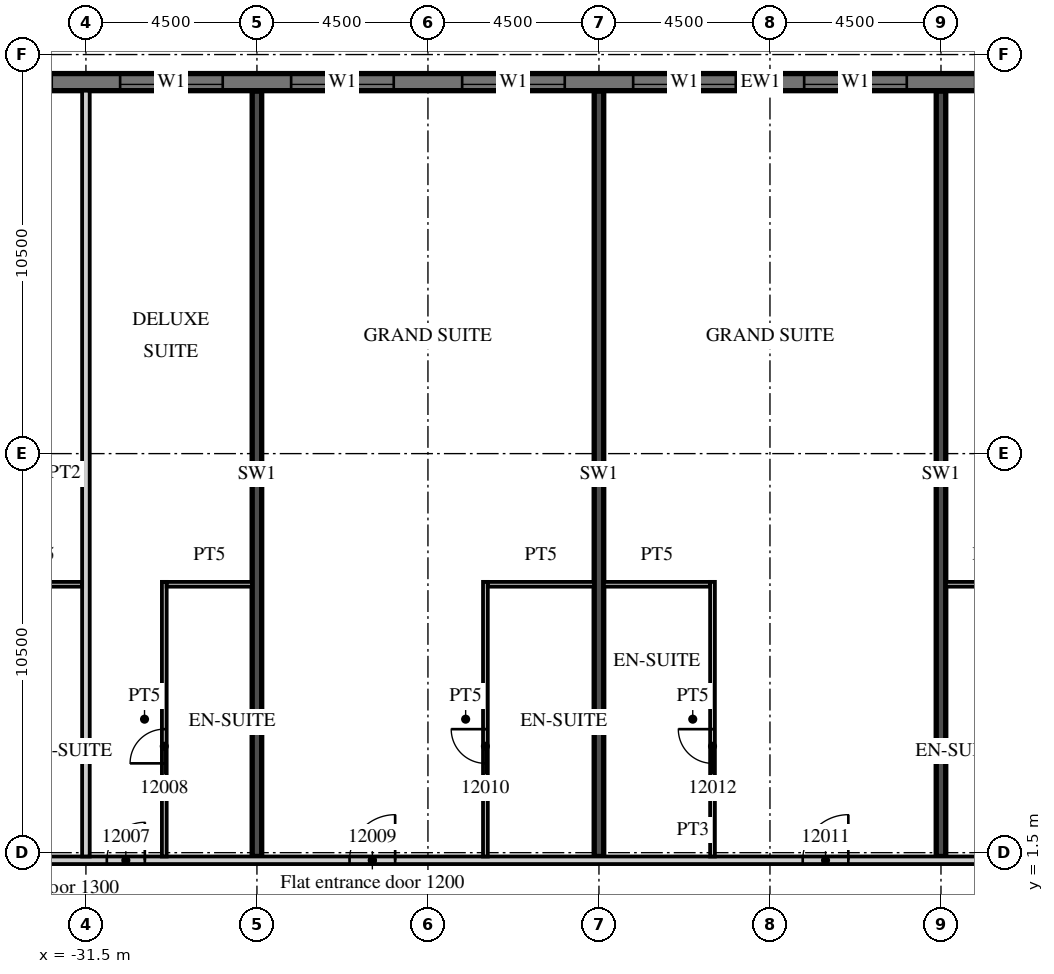
"""IFC4 building model, lengths in metres.
Left out: names, types, materials, properties, quantities, classifications, styles, units other than length and angle.
Written with IfcOpenShell. Run it as: python <this file> out.ifc"""

import sys

from ifc_helpers import new_model, si_unit, direction, frame, frame_2d, origin, place, context, subcontext, project, spatial, rectangle, extrude, element, fill, save


model = new_model("IFC4")
c1 = context("Model", 3, precision=1e-05, world=origin(), true_north=direction((0.0, 1.0)))
c2 = subcontext(c1, "Body", "Model", "MODEL_VIEW")
j1 = project(units=[si_unit("LENGTHUNIT", "METRE"), si_unit("PLANEANGLEUNIT", "RADIAN")], contexts=[c1])
p1 = place(None, origin())
s1 = spatial("IfcSite", under=j1, at=p1, CompositionType="ELEMENT")
p2 = place(p1, origin())
s2 = spatial("IfcBuilding", under=s1, at=p2, CompositionType="ELEMENT")
p3 = place(p2, frame((0.0, 0.0, 69.9)))
s3 = spatial("IfcBuildingStorey", under=s2, at=p3, CompositionType="ELEMENT", Elevation=69.9)
for number, where, z_axis, x_axis in (
    (1, (-27.0, 1.4, 0.0), (0.0, 0.0, 1.0), (0.0, 1.0, 0.0)),
    (2, (-18.0, 1.4, 0.0), (0.0, 0.0, 1.0), (0.0, 1.0, 0.0)),
    (3, (-9.0, 1.4, 0.0), (0.0, 0.0, 1.0), (0.0, 1.0, 0.0)),
):
    element("IfcWall", number, at=place(p3, frame(where, z_axis=z_axis, x_axis=x_axis)), inside=s3, PredefinedType="SHEAR", context=c2, shape_type="SweptSolid", body=[
        extrude(rectangle(XDim=20.14, YDim=0.25, at=frame_2d((10.07, 0.0))), origin(), (0.0, 0.0, 1.0), 3.3),
    ])
p4 = place(p3, frame((13.5, 21.775, 0.0), z_axis=(0.0, 0.0, 1.0), x_axis=(-1.0, 0.0, 0.0)))
e4 = element("IfcWall", 4, at=p4, inside=s3, PredefinedType="SOLIDWALL", context=c2, shape_type="SweptSolid", body=[
    extrude(rectangle(XDim=54.5, YDim=0.45, at=frame_2d((27.25, 0.0))), origin(), (0.0, 0.0, 1.0), 3.02),
])
p5 = place(p4, frame((0.9, 0.0, 0.45)))
e5 = element("IfcOpeningElement", 5, at=p5, cuts=e4, PredefinedType="OPENING", context=c2, shape_type="SweptSolid", body=[
    extrude(rectangle(XDim=2.7, YDim=2.25, at=frame_2d((1.35, 1.125))), frame((0.0, 0.235, 0.0), z_axis=(0.0, -1.0, 0.0), x_axis=(1.0, 0.0, 0.0)), (0.0, 0.0, 1.0), 0.47),
])
p6 = place(p4, frame((5.4, 0.0, 0.45)))
e6 = element("IfcOpeningElement", 6, at=p6, cuts=e4, PredefinedType="OPENING", context=c2, shape_type="SweptSolid", body=[
    extrude(rectangle(XDim=2.7, YDim=2.25, at=frame_2d((1.35, 1.125))), frame((0.0, 0.235, 0.0), z_axis=(0.0, -1.0, 0.0), x_axis=(1.0, 0.0, 0.0)), (0.0, 0.0, 1.0), 0.47),
])
p7 = place(p4, frame((9.9, 0.0, 0.45)))
e7 = element("IfcOpeningElement", 7, at=p7, cuts=e4, PredefinedType="OPENING", context=c2, shape_type="SweptSolid", body=[
    extrude(rectangle(XDim=2.7, YDim=2.25, at=frame_2d((1.35, 1.125))), frame((0.0, 0.235, 0.0), z_axis=(0.0, -1.0, 0.0), x_axis=(1.0, 0.0, 0.0)), (0.0, 0.0, 1.0), 0.47),
])
p8 = place(p4, frame((14.4, 0.0, 0.45)))
e8 = element("IfcOpeningElement", 8, at=p8, cuts=e4, PredefinedType="OPENING", context=c2, shape_type="SweptSolid", body=[
    extrude(rectangle(XDim=2.7, YDim=2.25, at=frame_2d((1.35, 1.125))), frame((0.0, 0.235, 0.0), z_axis=(0.0, -1.0, 0.0), x_axis=(1.0, 0.0, 0.0)), (0.0, 0.0, 1.0), 0.47),
])
p9 = place(p4, frame((18.9, 0.0, 0.45)))
e9 = element("IfcOpeningElement", 9, at=p9, cuts=e4, PredefinedType="OPENING", context=c2, shape_type="SweptSolid", body=[
    extrude(rectangle(XDim=2.7, YDim=2.25, at=frame_2d((1.35, 1.125))), frame((0.0, 0.235, 0.0), z_axis=(0.0, -1.0, 0.0), x_axis=(1.0, 0.0, 0.0)), (0.0, 0.0, 1.0), 0.47),
])
p10 = place(p4, frame((23.4, 0.0, 0.45)))
e10 = element("IfcOpeningElement", 10, at=p10, cuts=e4, PredefinedType="OPENING", context=c2, shape_type="SweptSolid", body=[
    extrude(rectangle(XDim=2.7, YDim=2.25, at=frame_2d((1.35, 1.125))), frame((0.0, 0.235, 0.0), z_axis=(0.0, -1.0, 0.0), x_axis=(1.0, 0.0, 0.0)), (0.0, 0.0, 1.0), 0.47),
])
p11 = place(p4, frame((27.9, 0.0, 0.45)))
e11 = element("IfcOpeningElement", 11, at=p11, cuts=e4, PredefinedType="OPENING", context=c2, shape_type="SweptSolid", body=[
    extrude(rectangle(XDim=2.7, YDim=2.25, at=frame_2d((1.35, 1.125))), frame((0.0, 0.235, 0.0), z_axis=(0.0, -1.0, 0.0), x_axis=(1.0, 0.0, 0.0)), (0.0, 0.0, 1.0), 0.47),
])
p12 = place(p4, frame((32.4, 0.0, 0.45)))
e12 = element("IfcOpeningElement", 12, at=p12, cuts=e4, PredefinedType="OPENING", context=c2, shape_type="SweptSolid", body=[
    extrude(rectangle(XDim=2.7, YDim=2.25, at=frame_2d((1.35, 1.125))), frame((0.0, 0.235, 0.0), z_axis=(0.0, -1.0, 0.0), x_axis=(1.0, 0.0, 0.0)), (0.0, 0.0, 1.0), 0.47),
])
p13 = place(p4, frame((36.9, 0.0, 0.45)))
e13 = element("IfcOpeningElement", 13, at=p13, cuts=e4, PredefinedType="OPENING", context=c2, shape_type="SweptSolid", body=[
    extrude(rectangle(XDim=2.7, YDim=2.25, at=frame_2d((1.35, 1.125))), frame((0.0, 0.235, 0.0), z_axis=(0.0, -1.0, 0.0), x_axis=(1.0, 0.0, 0.0)), (0.0, 0.0, 1.0), 0.47),
])
p14 = place(p4, frame((41.4, 0.0, 0.45)))
e14 = element("IfcOpeningElement", 14, at=p14, cuts=e4, PredefinedType="OPENING", context=c2, shape_type="SweptSolid", body=[
    extrude(rectangle(XDim=2.7, YDim=2.25, at=frame_2d((1.35, 1.125))), frame((0.0, 0.235, 0.0), z_axis=(0.0, -1.0, 0.0), x_axis=(1.0, 0.0, 0.0)), (0.0, 0.0, 1.0), 0.47),
])
p15 = place(p4, frame((45.9, 0.0, 0.45)))
e15 = element("IfcOpeningElement", 15, at=p15, cuts=e4, PredefinedType="OPENING", context=c2, shape_type="SweptSolid", body=[
    extrude(rectangle(XDim=2.7, YDim=2.25, at=frame_2d((1.35, 1.125))), frame((0.0, 0.235, 0.0), z_axis=(0.0, -1.0, 0.0), x_axis=(1.0, 0.0, 0.0)), (0.0, 0.0, 1.0), 0.47),
])
p16 = place(p4, frame((50.4, 0.0, 0.45)))
e16 = element("IfcOpeningElement", 16, at=p16, cuts=e4, PredefinedType="OPENING", context=c2, shape_type="SweptSolid", body=[
    extrude(rectangle(XDim=2.7, YDim=2.25, at=frame_2d((1.35, 1.125))), frame((0.0, 0.235, 0.0), z_axis=(0.0, -1.0, 0.0), x_axis=(1.0, 0.0, 0.0)), (0.0, 0.0, 1.0), 0.47),
])
p17 = place(p3, frame((-44.55, 1.3, 0.0), z_axis=(0.0, 0.0, 1.0), x_axis=(1.0, 0.0, 0.0)))
e17 = element("IfcWall", 17, at=p17, inside=s3, PredefinedType="PARTITIONING", context=c2, shape_type="SweptSolid", body=[
    extrude(rectangle(XDim=58.05, YDim=0.2, at=frame_2d((29.025, 0.0))), origin(), (0.0, 0.0, 1.0), 3.02),
])
p18 = place(p17, frame((0.525, 0.0, 0.0)))
e18 = element("IfcOpeningElement", 18, at=p18, cuts=e17, PredefinedType="OPENING", context=c2, shape_type="SweptSolid", body=[
    extrude(rectangle(XDim=1.0, YDim=2.1, at=frame_2d((0.5, 1.05))), frame((0.0, 0.11, 0.0), z_axis=(0.0, -1.0, 0.0), x_axis=(1.0, 0.0, 0.0)), (0.0, 0.0, 1.0), 0.22),
])
p19 = place(p17, frame((6.975, 0.0, 0.0)))
e19 = element("IfcOpeningElement", 19, at=p19, cuts=e17, PredefinedType="OPENING", context=c2, shape_type="SweptSolid", body=[
    extrude(rectangle(XDim=1.0, YDim=2.1, at=frame_2d((0.5, 1.05))), frame((0.0, 0.11, 0.0), z_axis=(0.0, -1.0, 0.0), x_axis=(1.0, 0.0, 0.0)), (0.0, 0.0, 1.0), 0.22),
])
p20 = place(p17, frame((9.125, 0.0, 0.0)))
e20 = element("IfcOpeningElement", 20, at=p20, cuts=e17, PredefinedType="OPENING", context=c2, shape_type="SweptSolid", body=[
    extrude(rectangle(XDim=1.0, YDim=2.1, at=frame_2d((0.5, 1.05))), frame((0.0, 0.11, 0.0), z_axis=(0.0, -1.0, 0.0), x_axis=(1.0, 0.0, 0.0)), (0.0, 0.0, 1.0), 0.22),
])
p21 = place(p17, frame((13.6, 0.0, 0.0)))
e21 = element("IfcOpeningElement", 21, at=p21, cuts=e17, PredefinedType="OPENING", context=c2, shape_type="SweptSolid", body=[
    extrude(rectangle(XDim=1.0, YDim=2.1, at=frame_2d((0.5, 1.05))), frame((0.0, 0.11, 0.0), z_axis=(0.0, -1.0, 0.0), x_axis=(1.0, 0.0, 0.0)), (0.0, 0.0, 1.0), 0.22),
])
p22 = place(p17, frame((19.987, 0.0, 0.0)))
e22 = element("IfcOpeningElement", 22, at=p22, cuts=e17, PredefinedType="OPENING", context=c2, shape_type="SweptSolid", body=[
    extrude(rectangle(XDim=1.2, YDim=2.1, at=frame_2d((0.6, 1.05))), frame((0.0, 0.11, 0.0), z_axis=(0.0, -1.0, 0.0), x_axis=(1.0, 0.0, 0.0)), (0.0, 0.0, 1.0), 0.22),
])
p23 = place(p17, frame((31.912, 0.0, 0.0)))
e23 = element("IfcOpeningElement", 23, at=p23, cuts=e17, PredefinedType="OPENING", context=c2, shape_type="SweptSolid", body=[
    extrude(rectangle(XDim=1.2, YDim=2.1, at=frame_2d((0.6, 1.05))), frame((0.0, 0.11, 0.0), z_axis=(0.0, -1.0, 0.0), x_axis=(1.0, 0.0, 0.0)), (0.0, 0.0, 1.0), 0.22),
])
p24 = place(p17, frame((38.5, 0.0, 0.0)))
e24 = element("IfcOpeningElement", 24, at=p24, cuts=e17, PredefinedType="OPENING", context=c2, shape_type="SweptSolid", body=[
    extrude(rectangle(XDim=1.0, YDim=2.1, at=frame_2d((0.5, 1.05))), frame((0.0, 0.11, 0.0), z_axis=(0.0, -1.0, 0.0), x_axis=(1.0, 0.0, 0.0)), (0.0, 0.0, 1.0), 0.22),
])
p25 = place(p17, frame((40.6, 0.0, 0.0)))
e25 = element("IfcOpeningElement", 25, at=p25, cuts=e17, PredefinedType="OPENING", context=c2, shape_type="SweptSolid", body=[
    extrude(rectangle(XDim=1.0, YDim=2.1, at=frame_2d((0.5, 1.05))), frame((0.0, 0.11, 0.0), z_axis=(0.0, -1.0, 0.0), x_axis=(1.0, 0.0, 0.0)), (0.0, 0.0, 1.0), 0.22),
])
p26 = place(p17, frame((47.5, 0.0, 0.0)))
e26 = element("IfcOpeningElement", 26, at=p26, cuts=e17, PredefinedType="OPENING", context=c2, shape_type="SweptSolid", body=[
    extrude(rectangle(XDim=1.0, YDim=2.1, at=frame_2d((0.5, 1.05))), frame((0.0, 0.11, 0.0), z_axis=(0.0, -1.0, 0.0), x_axis=(1.0, 0.0, 0.0)), (0.0, 0.0, 1.0), 0.22),
])
p27 = place(p17, frame((51.975, 0.0, 0.0)))
e27 = element("IfcOpeningElement", 27, at=p27, cuts=e17, PredefinedType="OPENING", context=c2, shape_type="SweptSolid", body=[
    extrude(rectangle(XDim=1.0, YDim=2.1, at=frame_2d((0.5, 1.05))), frame((0.0, 0.11, 0.0), z_axis=(0.0, -1.0, 0.0), x_axis=(1.0, 0.0, 0.0)), (0.0, 0.0, 1.0), 0.22),
])
p28 = place(p17, frame((56.475, 0.0, 0.0)))
e28 = element("IfcOpeningElement", 28, at=p28, cuts=e17, PredefinedType="OPENING", context=c2, shape_type="SweptSolid", body=[
    extrude(rectangle(XDim=1.0, YDim=2.1, at=frame_2d((0.5, 1.05))), frame((0.0, 0.11, 0.0), z_axis=(0.0, -1.0, 0.0), x_axis=(1.0, 0.0, 0.0)), (0.0, 0.0, 1.0), 0.22),
])
p29 = place(p3, frame((-31.5, 1.4, 0.0), z_axis=(0.0, 0.0, 1.0), x_axis=(0.0, 1.0, 0.0)))
e29 = element("IfcWall", 29, at=p29, inside=s3, PredefinedType="PARTITIONING", context=c2, shape_type="SweptSolid", body=[
    extrude(rectangle(XDim=20.15, YDim=0.2, at=frame_2d((10.075, 0.0))), origin(), (0.0, 0.0, 1.0), 3.02),
])
p30 = place(p3, frame((-33.85, 8.562, 0.0), z_axis=(0.0, 0.0, 1.0), x_axis=(1.0, 0.0, 0.0)))
e30 = element("IfcWall", 30, at=p30, inside=s3, PredefinedType="PARTITIONING", context=c2, shape_type="SweptSolid", body=[
    extrude(rectangle(XDim=2.25, YDim=0.125, at=frame_2d((1.125, 0.0))), origin(), (0.0, 0.0, 1.0), 3.02),
])
p31 = place(p3, frame((-29.438, 1.4, 0.0), z_axis=(0.0, 0.0, 1.0), x_axis=(0.0, 1.0, 0.0)))
e31 = element("IfcWall", 31, at=p31, inside=s3, PredefinedType="PARTITIONING", context=c2, shape_type="SweptSolid", body=[
    extrude(rectangle(XDim=7.225, YDim=0.125, at=frame_2d((3.613, 0.0))), origin(), (0.0, 0.0, 1.0), 3.02),
])
p32 = place(p31, frame((2.45, 0.0, 0.0)))
e32 = element("IfcOpeningElement", 32, at=p32, cuts=e31, PredefinedType="OPENING", context=c2, shape_type="SweptSolid", body=[
    extrude(rectangle(XDim=0.9, YDim=2.1, at=frame_2d((0.45, 1.05))), frame((0.0, 0.073, 0.0), z_axis=(0.0, -1.0, 0.0), x_axis=(1.0, 0.0, 0.0)), (0.0, 0.0, 1.0), 0.145),
])
p33 = place(p3, frame((-29.375, 8.562, 0.0), z_axis=(0.0, 0.0, 1.0), x_axis=(1.0, 0.0, 0.0)))
e33 = element("IfcWall", 33, at=p33, inside=s3, PredefinedType="PARTITIONING", context=c2, shape_type="SweptSolid", body=[
    extrude(rectangle(XDim=2.25, YDim=0.125, at=frame_2d((1.125, 0.0))), origin(), (0.0, 0.0, 1.0), 3.02),
])
p34 = place(p3, frame((-20.988, 1.4, 0.0), z_axis=(0.0, 0.0, 1.0), x_axis=(0.0, 1.0, 0.0)))
e34 = element("IfcWall", 34, at=p34, inside=s3, PredefinedType="PARTITIONING", context=c2, shape_type="SweptSolid", body=[
    extrude(rectangle(XDim=7.225, YDim=0.125, at=frame_2d((3.613, 0.0))), origin(), (0.0, 0.0, 1.0), 3.02),
])
p35 = place(p34, frame((2.45, 0.0, 0.0)))
e35 = element("IfcOpeningElement", 35, at=p35, cuts=e34, PredefinedType="OPENING", context=c2, shape_type="SweptSolid", body=[
    extrude(rectangle(XDim=0.9, YDim=2.1, at=frame_2d((0.45, 1.05))), frame((0.0, 0.073, 0.0), z_axis=(0.0, -1.0, 0.0), x_axis=(1.0, 0.0, 0.0)), (0.0, 0.0, 1.0), 0.145),
])
p36 = place(p3, frame((-20.925, 8.562, 0.0), z_axis=(0.0, 0.0, 1.0), x_axis=(1.0, 0.0, 0.0)))
e36 = element("IfcWall", 36, at=p36, inside=s3, PredefinedType="PARTITIONING", context=c2, shape_type="SweptSolid", body=[
    extrude(rectangle(XDim=2.8, YDim=0.125, at=frame_2d((1.4, 0.0))), origin(), (0.0, 0.0, 1.0), 3.02),
])
p37 = place(p3, frame((-15.012, 1.4, 0.0), z_axis=(0.0, 0.0, 1.0), x_axis=(0.0, 1.0, 0.0)))
e37 = element("IfcWall", 37, at=p37, inside=s3, PredefinedType="PARTITIONING", context=c2, shape_type="SweptSolid", body=[
    extrude(rectangle(XDim=7.225, YDim=0.125, at=frame_2d((3.613, 0.0))), origin(), (0.0, 0.0, 1.0), 3.02),
])
p38 = place(p37, frame((2.45, 0.0, 0.0)))
e38 = element("IfcOpeningElement", 38, at=p38, cuts=e37, PredefinedType="OPENING", context=c2, shape_type="SweptSolid", body=[
    extrude(rectangle(XDim=0.9, YDim=2.1, at=frame_2d((0.45, 1.05))), frame((0.0, 0.073, 0.0), z_axis=(0.0, -1.0, 0.0), x_axis=(1.0, 0.0, 0.0)), (0.0, 0.0, 1.0), 0.145),
])
p39 = place(p3, frame((-17.875, 8.562, 0.0), z_axis=(0.0, 0.0, 1.0), x_axis=(1.0, 0.0, 0.0)))
e39 = element("IfcWall", 39, at=p39, inside=s3, PredefinedType="PARTITIONING", context=c2, shape_type="SweptSolid", body=[
    extrude(rectangle(XDim=2.8, YDim=0.125, at=frame_2d((1.4, 0.0))), origin(), (0.0, 0.0, 1.0), 3.02),
])
p40 = place(p3, frame((-8.875, 8.562, 0.0), z_axis=(0.0, 0.0, 1.0), x_axis=(1.0, 0.0, 0.0)))
e40 = element("IfcWall", 40, at=p40, inside=s3, PredefinedType="PARTITIONING", context=c2, shape_type="SweptSolid", body=[
    extrude(rectangle(XDim=2.25, YDim=0.125, at=frame_2d((1.125, 0.0))), origin(), (0.0, 0.0, 1.0), 3.02),
])
p41 = place(p10, origin())
e41 = element("IfcWindow", 41, at=p41, inside=s3, PartitioningType="SINGLE_PANEL", PredefinedType="WINDOW", context=c2, shape_type="SweptSolid", body=[
    extrude(rectangle(XDim=2.7, YDim=2.25, at=frame_2d((1.35, 1.125))), frame((0.0, 0.09, 0.0), z_axis=(0.0, -1.0, 0.0), x_axis=(1.0, 0.0, 0.0)), (0.0, 0.0, 1.0), 0.06),
])
fill(e10, e41)
p42 = place(p11, origin())
e42 = element("IfcWindow", 42, at=p42, inside=s3, PartitioningType="SINGLE_PANEL", PredefinedType="WINDOW", context=c2, shape_type="SweptSolid", body=[
    extrude(rectangle(XDim=2.7, YDim=2.25, at=frame_2d((1.35, 1.125))), frame((0.0, 0.09, 0.0), z_axis=(0.0, -1.0, 0.0), x_axis=(1.0, 0.0, 0.0)), (0.0, 0.0, 1.0), 0.06),
])
fill(e11, e42)
p43 = place(p12, origin())
e43 = element("IfcWindow", 43, at=p43, inside=s3, PartitioningType="SINGLE_PANEL", PredefinedType="WINDOW", context=c2, shape_type="SweptSolid", body=[
    extrude(rectangle(XDim=2.7, YDim=2.25, at=frame_2d((1.35, 1.125))), frame((0.0, 0.09, 0.0), z_axis=(0.0, -1.0, 0.0), x_axis=(1.0, 0.0, 0.0)), (0.0, 0.0, 1.0), 0.06),
])
fill(e12, e43)
p44 = place(p13, origin())
e44 = element("IfcWindow", 44, at=p44, inside=s3, PartitioningType="SINGLE_PANEL", PredefinedType="WINDOW", context=c2, shape_type="SweptSolid", body=[
    extrude(rectangle(XDim=2.7, YDim=2.25, at=frame_2d((1.35, 1.125))), frame((0.0, 0.09, 0.0), z_axis=(0.0, -1.0, 0.0), x_axis=(1.0, 0.0, 0.0)), (0.0, 0.0, 1.0), 0.06),
])
fill(e13, e44)
p45 = place(p14, origin())
e45 = element("IfcWindow", 45, at=p45, inside=s3, PartitioningType="SINGLE_PANEL", PredefinedType="WINDOW", context=c2, shape_type="SweptSolid", body=[
    extrude(rectangle(XDim=2.7, YDim=2.25, at=frame_2d((1.35, 1.125))), frame((0.0, 0.09, 0.0), z_axis=(0.0, -1.0, 0.0), x_axis=(1.0, 0.0, 0.0)), (0.0, 0.0, 1.0), 0.06),
])
fill(e14, e45)
p46 = place(p21, origin())
e46 = element("IfcDoor", 46, at=p46, inside=s3, OperationType="SINGLE_SWING_RIGHT", PredefinedType="DOOR", context=c2, shape_type="SweptSolid", body=[
    extrude(rectangle(XDim=1.0, YDim=2.1, at=frame_2d((0.5, 1.05))), frame((0.0, 0.025, 0.0), z_axis=(0.0, -1.0, 0.0), x_axis=(1.0, 0.0, 0.0)), (0.0, 0.0, 1.0), 0.05),
])
fill(e21, e46)
p47 = place(p32, origin())
e47 = element("IfcDoor", 47, at=p47, inside=s3, OperationType="SINGLE_SWING_LEFT", PredefinedType="DOOR", context=c2, shape_type="SweptSolid", body=[
    extrude(rectangle(XDim=0.9, YDim=2.1, at=frame_2d((0.45, 1.05))), frame((0.0, 0.025, 0.0), z_axis=(0.0, -1.0, 0.0), x_axis=(1.0, 0.0, 0.0)), (0.0, 0.0, 1.0), 0.05),
])
fill(e32, e47)
p48 = place(p22, origin())
e48 = element("IfcDoor", 48, at=p48, inside=s3, OperationType="SINGLE_SWING_RIGHT", PredefinedType="DOOR", context=c2, shape_type="SweptSolid", body=[
    extrude(rectangle(XDim=1.2, YDim=2.1, at=frame_2d((0.6, 1.05))), frame((0.0, 0.025, 0.0), z_axis=(0.0, -1.0, 0.0), x_axis=(1.0, 0.0, 0.0)), (0.0, 0.0, 1.0), 0.05),
])
fill(e22, e48)
p49 = place(p35, origin())
e49 = element("IfcDoor", 49, at=p49, inside=s3, OperationType="SINGLE_SWING_RIGHT", PredefinedType="DOOR", context=c2, shape_type="SweptSolid", body=[
    extrude(rectangle(XDim=0.9, YDim=2.1, at=frame_2d((0.45, 1.05))), frame((0.0, 0.025, 0.0), z_axis=(0.0, -1.0, 0.0), x_axis=(1.0, 0.0, 0.0)), (0.0, 0.0, 1.0), 0.05),
])
fill(e35, e49)
p50 = place(p23, origin())
e50 = element("IfcDoor", 50, at=p50, inside=s3, OperationType="SINGLE_SWING_RIGHT", PredefinedType="DOOR", context=c2, shape_type="SweptSolid", body=[
    extrude(rectangle(XDim=1.2, YDim=2.1, at=frame_2d((0.6, 1.05))), frame((0.0, 0.025, 0.0), z_axis=(0.0, -1.0, 0.0), x_axis=(1.0, 0.0, 0.0)), (0.0, 0.0, 1.0), 0.05),
])
fill(e23, e50)
p51 = place(p38, origin())
e51 = element("IfcDoor", 51, at=p51, inside=s3, OperationType="SINGLE_SWING_RIGHT", PredefinedType="DOOR", context=c2, shape_type="SweptSolid", body=[
    extrude(rectangle(XDim=0.9, YDim=2.1, at=frame_2d((0.45, 1.05))), frame((0.0, 0.025, 0.0), z_axis=(0.0, -1.0, 0.0), x_axis=(1.0, 0.0, 0.0)), (0.0, 0.0, 1.0), 0.05),
])
fill(e38, e51)
save(model, sys.argv[1])
